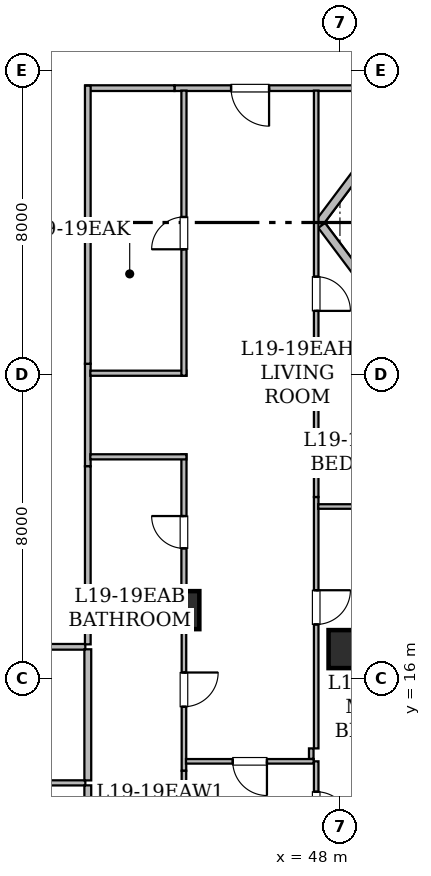
"""IFC4 building model, lengths in metres.
Left out: names, types, materials, properties, quantities, classifications, styles, units other than length and angle.
Written with IfcOpenShell. Run it as: python <this file> out.ifc"""

import sys

from ifc_helpers import new_model, si_unit, direction, frame, frame_2d, origin, origin_2d, place, context, subcontext, project, spatial, rectangle, hollow_rectangle, extrude, element, fill, save


model = new_model("IFC4")
c1 = context("Model", 3, precision=1e-05, world=origin(), true_north=direction((0.0, 1.0)))
c2 = subcontext(c1, "Body", "Model", "MODEL_VIEW")
j1 = project(units=[si_unit("LENGTHUNIT", "METRE"), si_unit("PLANEANGLEUNIT", "RADIAN")], contexts=[c1])
p1 = place(None, origin())
s1 = spatial("IfcSite", under=j1, at=p1, CompositionType="ELEMENT")
p2 = place(p1, origin())
s2 = spatial("IfcBuilding", under=s1, at=p2, CompositionType="ELEMENT")
p3 = place(p2, frame((0.0, 0.0, 77.1)))
s3 = spatial("IfcBuildingStorey", under=s2, at=p3, CompositionType="ELEMENT", Elevation=77.1)
for number, where, z_axis, x_axis in (
    (1, (48.2, 16.775, 0.0), (0.0, 0.0, 1.0), (1.0, 0.0, 0.0)),
    (2, (43.8, 17.8, 0.0), (0.0, 0.0, 1.0), (1.0, 0.0, 0.0)),
):
    element("IfcColumn", number, at=place(p3, frame(where, z_axis=z_axis, x_axis=x_axis)), inside=s3, PredefinedType="COLUMN", context=c2, shape_type="SweptSolid", body=[
        extrude(hollow_rectangle(XDim=1.0, YDim=1.0, WallThickness=0.05, at=origin_2d()), origin(), (0.0, 0.0, 1.0), 3.65),
    ])
p4 = place(p3, frame((49.856, 31.191, 0.0), z_axis=(0.0, 0.0, 1.0), x_axis=(-0.600137081448, -0.799897170561, 0.0)))
e3 = element("IfcWall", 3, at=p4, inside=s3, PredefinedType="STANDARD", context=c2, shape_type="SweptSolid", body=[
    extrude(rectangle(XDim=3.989, YDim=0.22, at=frame_2d((1.995, 0.0))), origin(), (0.0, 0.0, 1.0), 3.43),
])
p5 = place(p3, frame((47.519, 27.923, 0.0), z_axis=(0.0, 0.0, 1.0), x_axis=(0.600118645218, -0.799911002338, 0.0)))
e4 = element("IfcWall", 4, at=p5, inside=s3, PredefinedType="STANDARD", context=c2, shape_type="SweptSolid", body=[
    extrude(rectangle(XDim=3.951, YDim=0.22, at=frame_2d((1.975, 0.0))), origin(), (0.0, 0.0, 1.0), 3.43),
])
p6 = place(p3, frame((41.3, 16.835, 0.0), z_axis=(0.0, 0.0, 1.0), x_axis=(-1.0, 0.0, 0.0)))
e5 = element("IfcWall", 5, at=p6, inside=s3, PredefinedType="STANDARD", context=c2, shape_type="SweptSolid", body=[
    extrude(rectangle(XDim=7.001, YDim=0.15, at=frame_2d((3.5, 0.0))), origin(), (0.0, 0.0, 1.0), 3.43),
])
p7 = place(p3, frame((41.365, 18.118, 0.0), z_axis=(0.0, 0.0, 1.0), x_axis=(0.0, -1.0, 0.0)))
e6 = element("IfcWall", 6, at=p7, inside=s3, PredefinedType="STANDARD", context=c2, shape_type="SweptSolid", body=[
    extrude(rectangle(XDim=1.218, YDim=0.15, at=frame_2d((0.609, 0.0))), origin(), (0.0, 0.0, 1.0), 3.43),
])
p8 = place(p3, frame((49.788, 31.535, 0.0), z_axis=(0.0, 0.0, 1.0), x_axis=(-1.0, 0.0, 0.0)))
e7 = element("IfcWall", 7, at=p8, inside=s3, PredefinedType="STANDARD", context=c2, shape_type="SweptSolid", body=[
    extrude(rectangle(XDim=6.142, YDim=0.15, at=frame_2d((3.071, 0.0))), origin(), (0.0, 0.0, 1.0), 2.647),
])
p9 = place(p8, frame((3.653, 0.0, 0.0)))
e8 = element("IfcOpeningElement", 8, at=p9, cuts=e7, PredefinedType="OPENING", context=c2, shape_type="SweptSolid", body=[
    extrude(rectangle(XDim=1.0, YDim=2.15, at=frame_2d((0.5, 1.075))), frame((0.0, 0.085, 0.0), z_axis=(0.0, -1.0, 0.0), x_axis=(1.0, 0.0, 0.0)), (0.0, 0.0, 1.0), 0.17),
])
p10 = place(p3, frame((41.365, 24.283, 0.0), z_axis=(0.0, 0.0, 1.0), x_axis=(0.0, -1.0, 0.0)))
e9 = element("IfcWall", 9, at=p10, inside=s3, PredefinedType="STANDARD", context=c2, shape_type="SweptSolid", body=[
    extrude(rectangle(XDim=2.698, YDim=0.15, at=frame_2d((1.349, 0.0))), origin(), (0.0, 0.0, 1.0), 3.43),
])
p11 = place(p3, frame((41.365, 21.585, 0.0), z_axis=(0.0, 0.0, 1.0), x_axis=(0.0, -1.0, 0.0)))
e10 = element("IfcWall", 10, at=p11, inside=s3, PredefinedType="STANDARD", context=c2, shape_type="SweptSolid", body=[
    extrude(rectangle(XDim=3.467, YDim=0.15, at=frame_2d((1.733, 0.0))), origin(), (0.0, 0.0, 1.0), 2.647),
])
p12 = place(p3, frame((43.646, 31.535, 0.0), z_axis=(0.0, 0.0, 1.0), x_axis=(-1.0, 0.0, 0.0)))
e11 = element("IfcWall", 11, at=p12, inside=s3, PredefinedType="STANDARD", context=c2, shape_type="SweptSolid", body=[
    extrude(rectangle(XDim=2.346, YDim=0.15, at=frame_2d((1.173, 0.0))), origin(), (0.0, 0.0, 1.0), 2.647),
])
p13 = place(p3, frame((41.365, 31.6, 0.0), z_axis=(0.0, 0.0, 1.0), x_axis=(0.0, -1.0, 0.0)))
e12 = element("IfcWall", 12, at=p13, inside=s3, PredefinedType="STANDARD", context=c2, shape_type="SweptSolid", body=[
    extrude(rectangle(XDim=7.317, YDim=0.15, at=frame_2d((3.659, 0.0))), origin(), (0.0, 0.0, 1.0), 2.961),
])
p14 = place(p3, frame((33.985, 13.255, 0.0), z_axis=(0.0, 0.0, 1.0), x_axis=(1.0, 0.0, 0.0)))
e13 = element("IfcWall", 13, at=p14, inside=s3, PredefinedType="PARTITIONING", context=c2, shape_type="SweptSolid", body=[
    extrude(rectangle(XDim=7.315, YDim=0.135, at=frame_2d((3.657, 0.0))), origin(), (0.0, 0.0, 1.0), 3.43),
])
p15 = place(p14, frame((3.233, 0.0, 0.0)))
e14 = element("IfcOpeningElement", 14, at=p15, cuts=e13, PredefinedType="OPENING", context=c2, shape_type="SweptSolid", body=[
    extrude(rectangle(XDim=0.85, YDim=2.1, at=frame_2d((0.425, 1.05))), frame((0.0, 0.077, 0.0), z_axis=(0.0, -1.0, 0.0), x_axis=(1.0, 0.0, 0.0)), (0.0, 0.0, 1.0), 0.155),
])
p16 = place(p3, frame((41.365, 13.19, 0.0), z_axis=(0.0, 0.0, 1.0), x_axis=(0.0, -1.0, 0.0)))
e15 = element("IfcWall", 15, at=p16, inside=s3, PredefinedType="STANDARD", context=c2, shape_type="SweptSolid", body=[
    extrude(rectangle(XDim=1.45, YDim=0.18, at=frame_2d((0.725, 0.0))), origin(), (0.0, 0.0, 1.0), 3.43),
])
p17 = place(p3, frame((41.365, 16.77, 0.0), z_axis=(0.0, 0.0, 1.0), x_axis=(0.0, -1.0, 0.0)))
e16 = element("IfcWall", 16, at=p17, inside=s3, PredefinedType="STANDARD", context=c2, shape_type="SweptSolid", body=[
    extrude(rectangle(XDim=3.45, YDim=0.18, at=frame_2d((1.725, 0.0))), origin(), (0.0, 0.0, 1.0), 3.43),
])
p18 = place(p3, frame((43.895, 17.804, 0.0), z_axis=(0.0, 0.0, 1.0), x_axis=(0.0, -1.0, 0.0)))
e17 = element("IfcWall", 17, at=p18, inside=s3, PredefinedType="PARTITIONING", context=c2, shape_type="SweptSolid", body=[
    extrude(rectangle(XDim=4.231, YDim=0.12, at=frame_2d((2.115, 0.0))), origin(), (0.0, 0.0, 1.0), 2.647),
])
p19 = place(p18, frame((1.645, 0.0, 0.0)))
e18 = element("IfcOpeningElement", 18, at=p19, cuts=e17, PredefinedType="OPENING", context=c2, shape_type="SweptSolid", body=[
    extrude(rectangle(XDim=0.9, YDim=2.1, at=frame_2d((0.45, 1.05))), frame((0.0, 0.07, 0.0), z_axis=(0.0, -1.0, 0.0), x_axis=(1.0, 0.0, 0.0)), (0.0, 0.0, 1.0), 0.14),
])
p20 = place(p3, frame((43.895, 13.573, 0.0), z_axis=(0.0, 0.0, 1.0), x_axis=(0.0, -1.0, 0.0)))
e19 = element("IfcWall", 19, at=p20, inside=s3, PredefinedType="PARTITIONING", context=c2, shape_type="SweptSolid", body=[
    extrude(rectangle(XDim=10.361, YDim=0.12, at=frame_2d((5.181, 0.0))), origin(), (0.0, 0.0, 1.0), 2.647),
])
p21 = place(p20, frame((4.731, 0.0, 0.0)))
e20 = element("IfcOpeningElement", 20, at=p21, cuts=e19, PredefinedType="OPENING", context=c2, shape_type="SweptSolid", body=[
    extrude(rectangle(XDim=0.9, YDim=2.1, at=frame_2d((0.45, 1.05))), frame((0.0, 0.07, 0.0), z_axis=(0.0, -1.0, 0.0), x_axis=(1.0, 0.0, 0.0)), (0.0, 0.0, 1.0), 0.14),
])
p22 = place(p3, frame((41.432, 17.869, 0.0), z_axis=(0.0, 0.0, 1.0), x_axis=(1.0, 0.0, 0.0)))
e21 = element("IfcWall", 21, at=p22, inside=s3, PredefinedType="PARTITIONING", context=c2, shape_type="SweptSolid", body=[
    extrude(rectangle(XDim=2.398, YDim=0.135, at=frame_2d((1.199, 0.0))), origin(), (0.0, 0.0, 1.0), 2.647),
])
p23 = place(p3, frame((47.31, 13.822, 0.0), z_axis=(0.0, 0.0, 1.0), x_axis=(-1.0, 0.0, 0.0)))
e22 = element("IfcWall", 22, at=p23, inside=s3, PredefinedType="PARTITIONING", context=c2, shape_type="SweptSolid", body=[
    extrude(rectangle(XDim=3.361, YDim=0.12, at=frame_2d((1.681, 0.0))), origin(), (0.0, 0.0, 1.0), 2.647),
])
p24 = place(p23, frame((1.231, 0.0, 0.0)))
e23 = element("IfcOpeningElement", 23, at=p24, cuts=e22, PredefinedType="OPENING", context=c2, shape_type="SweptSolid", body=[
    extrude(rectangle(XDim=0.9, YDim=2.1, at=frame_2d((0.45, 1.05))), frame((0.0, 0.07, 0.0), z_axis=(0.0, -1.0, 0.0), x_axis=(1.0, 0.0, 0.0)), (0.0, 0.0, 1.0), 0.14),
])
p25 = place(p3, frame((47.245, 14.162, 0.0), z_axis=(0.0, 0.0, 1.0), x_axis=(0.0, -1.0, 0.0)))
e24 = element("IfcWall", 24, at=p25, inside=s3, PredefinedType="PARTITIONING", context=c2, shape_type="SweptSolid", body=[
    extrude(rectangle(XDim=0.275, YDim=0.12, at=frame_2d((0.138, 0.0))), origin(), (0.0, 0.0, 1.0), 2.803),
])
p26 = place(p3, frame((43.895, 17.804, 0.0), z_axis=(0.0, 0.0, 1.0), x_axis=(0.0, 1.0, 0.0)))
e25 = element("IfcWall", 25, at=p26, inside=s3, PredefinedType="PARTITIONING", context=c2, shape_type="SweptSolid", body=[
    extrude(rectangle(XDim=4.095, YDim=0.135, at=frame_2d((2.047, 0.0))), origin(), (0.0, 0.0, 1.0), 2.647),
])
p27 = place(p26, frame((1.622, 0.0, 0.0)))
e26 = element("IfcOpeningElement", 26, at=p27, cuts=e25, PredefinedType="OPENING", context=c2, shape_type="SweptSolid", body=[
    extrude(rectangle(XDim=0.85, YDim=2.1, at=frame_2d((0.425, 1.05))), frame((0.0, 0.077, 0.0), z_axis=(0.0, -1.0, 0.0), x_axis=(1.0, 0.0, 0.0)), (0.0, 0.0, 1.0), 0.155),
])
for number, where, z_axis, x_axis in (
    (27, (43.96, 21.834, 0.0), (0.0, 0.0, 1.0), (-1.0, 0.0, 0.0)),
    (28, (41.432, 24.034, 0.0), (0.0, 0.0, 1.0), (1.0, 0.0, 0.0)),
):
    element("IfcWall", number, at=place(p3, frame(where, z_axis=z_axis, x_axis=x_axis)), inside=s3, PredefinedType="PARTITIONING", context=c2, shape_type="SweptSolid", body=[
        extrude(rectangle(XDim=2.528, YDim=0.135, at=frame_2d((1.264, 0.0))), origin(), (0.0, 0.0, 1.0), 2.647),
    ])
p28 = place(p3, frame((43.895, 23.969, 0.0), z_axis=(0.0, 0.0, 1.0), x_axis=(0.0, 1.0, 0.0)))
e29 = element("IfcWall", 29, at=p28, inside=s3, PredefinedType="PARTITIONING", context=c2, shape_type="SweptSolid", body=[
    extrude(rectangle(XDim=7.501, YDim=0.135, at=frame_2d((3.75, 0.0))), origin(), (0.0, 0.0, 1.0), 2.647),
])
p29 = place(p28, frame((3.326, 0.0, 0.0)))
e30 = element("IfcOpeningElement", 30, at=p29, cuts=e29, PredefinedType="OPENING", context=c2, shape_type="SweptSolid", body=[
    extrude(rectangle(XDim=0.85, YDim=2.1, at=frame_2d((0.425, 1.05))), frame((0.0, 0.077, 0.0), z_axis=(0.0, -1.0, 0.0), x_axis=(1.0, 0.0, 0.0)), (0.0, 0.0, 1.0), 0.155),
])
p30 = place(p3, frame((47.375, 20.777, 0.0), z_axis=(0.0, 0.0, 1.0), x_axis=(0.0, -1.0, 0.0)))
e31 = element("IfcWall", 31, at=p30, inside=s3, PredefinedType="PARTITIONING", context=c2, shape_type="SweptSolid", body=[
    extrude(rectangle(XDim=6.615, YDim=0.12, at=frame_2d((3.308, 0.0))), origin(), (0.0, 0.0, 1.0), 2.647),
])
p31 = place(p30, frame((2.453, 0.0, 0.0)))
e32 = element("IfcOpeningElement", 32, at=p31, cuts=e31, PredefinedType="OPENING", context=c2, shape_type="SweptSolid", body=[
    extrude(rectangle(XDim=0.9, YDim=2.1, at=frame_2d((0.45, 1.05))), frame((0.0, 0.07, 0.0), z_axis=(0.0, -1.0, 0.0), x_axis=(1.0, 0.0, 0.0)), (0.0, 0.0, 1.0), 0.14),
])
p32 = place(p3, frame((47.375, 31.47, 0.0), z_axis=(0.0, 0.0, 1.0), x_axis=(0.0, -1.0, 0.0)))
e33 = element("IfcWall", 33, at=p32, inside=s3, PredefinedType="PARTITIONING", context=c2, shape_type="SweptSolid", body=[
    extrude(rectangle(XDim=10.693, YDim=0.12, at=frame_2d((5.346, 0.0))), origin(), (0.0, 0.0, 1.0), 2.961),
])
p33 = place(p32, frame((4.896, 0.0, 0.0)))
e34 = element("IfcOpeningElement", 34, at=p33, cuts=e33, PredefinedType="OPENING", context=c2, shape_type="SweptSolid", body=[
    extrude(rectangle(XDim=0.9, YDim=2.1, at=frame_2d((0.45, 1.05))), frame((0.0, 0.07, 0.0), z_axis=(0.0, -1.0, 0.0), x_axis=(1.0, 0.0, 0.0)), (0.0, 0.0, 1.0), 0.14),
])
p34 = place(p3, frame((47.375, 13.822, 0.0), z_axis=(0.0, 0.0, 1.0), x_axis=(0.0, -1.0, 0.0)))
e35 = element("IfcWall", 35, at=p34, inside=s3, PredefinedType="PARTITIONING", context=c2, shape_type="SweptSolid", body=[
    extrude(rectangle(XDim=2.499, YDim=0.12, at=frame_2d((1.25, 0.0))), origin(), (0.0, 0.0, 1.0), 2.803),
])
p35 = place(p34, frame((0.8, 0.0, 0.0)))
e36 = element("IfcOpeningElement", 36, at=p35, cuts=e35, PredefinedType="OPENING", context=c2, shape_type="SweptSolid", body=[
    extrude(rectangle(XDim=0.9, YDim=2.1, at=frame_2d((0.45, 1.05))), frame((0.0, 0.07, 0.0), z_axis=(0.0, -1.0, 0.0), x_axis=(1.0, 0.0, 0.0)), (0.0, 0.0, 1.0), 0.14),
])
p36 = place(p3, frame((47.429, 20.527, 0.0), z_axis=(0.0, 0.0, 1.0), x_axis=(1.0, 0.0, 0.0)))
e37 = element("IfcWall", 37, at=p36, inside=s3, PredefinedType="PARTITIONING", context=c2, shape_type="SweptSolid", body=[
    extrude(rectangle(XDim=2.359, YDim=0.12, at=frame_2d((1.18, 0.0))), origin(), (0.0, 0.0, 1.0), 2.803),
])
p37 = place(p9, origin())
e38 = element("IfcDoor", 38, at=p37, inside=s3, OperationType="SINGLE_SWING_LEFT", PredefinedType="DOOR", context=c2, shape_type="SweptSolid", body=[
    extrude(rectangle(XDim=1.0, YDim=2.15, at=frame_2d((0.5, 1.075))), frame((0.0, 0.025, 0.0), z_axis=(0.0, -1.0, 0.0), x_axis=(1.0, 0.0, 0.0)), (0.0, 0.0, 1.0), 0.05),
])
fill(e8, e38)
p38 = place(p19, origin())
e39 = element("IfcDoor", 39, at=p38, inside=s3, OperationType="SINGLE_SWING_LEFT", PredefinedType="DOOR", context=c2, shape_type="SweptSolid", body=[
    extrude(rectangle(XDim=0.9, YDim=2.1, at=frame_2d((0.45, 1.05))), frame((0.0, 0.025, 0.0), z_axis=(0.0, -1.0, 0.0), x_axis=(1.0, 0.0, 0.0)), (0.0, 0.0, 1.0), 0.05),
])
fill(e18, e39)
p39 = place(p24, origin())
e40 = element("IfcDoor", 40, at=p39, inside=s3, OperationType="SINGLE_SWING_LEFT", PredefinedType="DOOR", context=c2, shape_type="SweptSolid", body=[
    extrude(rectangle(XDim=0.9, YDim=2.1, at=frame_2d((0.45, 1.05))), frame((0.0, 0.025, 0.0), z_axis=(0.0, -1.0, 0.0), x_axis=(1.0, 0.0, 0.0)), (0.0, 0.0, 1.0), 0.05),
])
fill(e23, e40)
p40 = place(p27, origin())
e41 = element("IfcDoor", 41, at=p40, inside=s3, OperationType="SINGLE_SWING_RIGHT", PredefinedType="DOOR", context=c2, shape_type="SweptSolid", body=[
    extrude(rectangle(XDim=0.85, YDim=2.1, at=frame_2d((0.425, 1.05))), frame((0.0, 0.025, 0.0), z_axis=(0.0, -1.0, 0.0), x_axis=(1.0, 0.0, 0.0)), (0.0, 0.0, 1.0), 0.05),
])
fill(e26, e41)
p41 = place(p29, origin())
e42 = element("IfcDoor", 42, at=p41, inside=s3, OperationType="SINGLE_SWING_LEFT", PredefinedType="DOOR", context=c2, shape_type="SweptSolid", body=[
    extrude(rectangle(XDim=0.85, YDim=2.1, at=frame_2d((0.425, 1.05))), frame((0.0, 0.025, 0.0), z_axis=(0.0, -1.0, 0.0), x_axis=(1.0, 0.0, 0.0)), (0.0, 0.0, 1.0), 0.05),
])
fill(e30, e42)
p42 = place(p31, origin())
e43 = element("IfcDoor", 43, at=p42, inside=s3, OperationType="SINGLE_SWING_LEFT", PredefinedType="DOOR", context=c2, shape_type="SweptSolid", body=[
    extrude(rectangle(XDim=0.9, YDim=2.1, at=frame_2d((0.45, 1.05))), frame((0.0, 0.025, 0.0), z_axis=(0.0, -1.0, 0.0), x_axis=(1.0, 0.0, 0.0)), (0.0, 0.0, 1.0), 0.05),
])
fill(e32, e43)
p43 = place(p33, origin())
e44 = element("IfcDoor", 44, at=p43, inside=s3, OperationType="SINGLE_SWING_RIGHT", PredefinedType="DOOR", context=c2, shape_type="SweptSolid", body=[
    extrude(rectangle(XDim=0.9, YDim=2.1, at=frame_2d((0.45, 1.05))), frame((0.0, 0.025, 0.0), z_axis=(0.0, -1.0, 0.0), x_axis=(1.0, 0.0, 0.0)), (0.0, 0.0, 1.0), 0.05),
])
fill(e34, e44)
p44 = place(p35, origin())
e45 = element("IfcDoor", 45, at=p44, inside=s3, OperationType="SINGLE_SWING_RIGHT", PredefinedType="DOOR", context=c2, shape_type="SweptSolid", body=[
    extrude(rectangle(XDim=0.9, YDim=2.1, at=frame_2d((0.45, 1.05))), frame((0.0, 0.025, 0.0), z_axis=(0.0, -1.0, 0.0), x_axis=(1.0, 0.0, 0.0)), (0.0, 0.0, 1.0), 0.05),
])
fill(e36, e45)
save(model, sys.argv[1])
